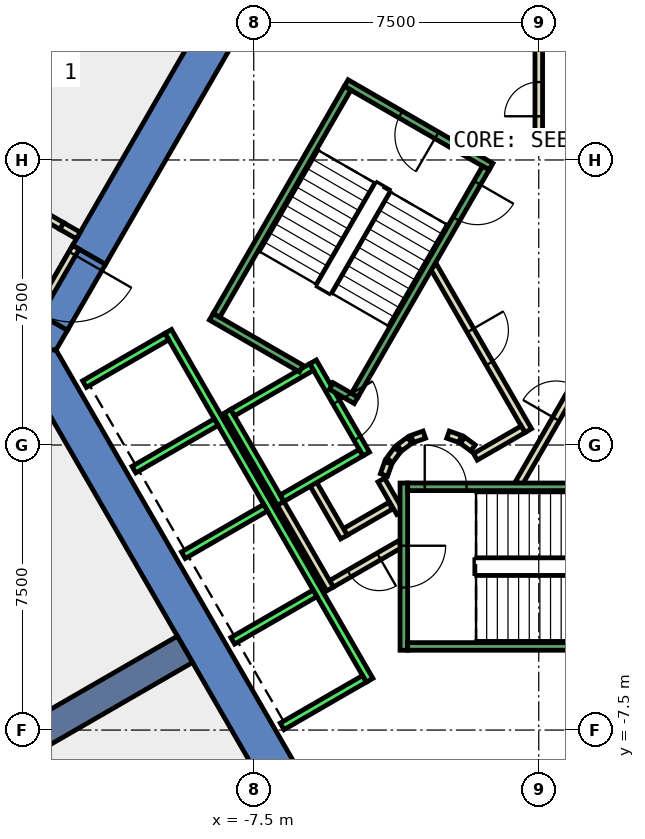
"""IFC4 building model, lengths in metres.
Left out: names, types, materials, properties, quantities, classifications, styles, units other than length and angle.
Written with IfcOpenShell. Run it as: python <this file> out.ifc"""

import sys

from ifc_helpers import new_model, si_unit, direction, frame, frame_2d, origin, place, context, subcontext, project, spatial, polyline, rectangle, outline, extrude, element, fill, save


model = new_model("IFC4")
c1 = context("Model", 3, precision=1e-05, world=origin(), true_north=direction((0.0, 1.0)))
c2 = subcontext(c1, "Body", "Model", "MODEL_VIEW")
j1 = project(units=[si_unit("LENGTHUNIT", "METRE"), si_unit("PLANEANGLEUNIT", "RADIAN")], contexts=[c1])
p1 = place(None, origin())
s1 = spatial("IfcSite", under=j1, at=p1, CompositionType="ELEMENT")
p2 = place(p1, origin())
s2 = spatial("IfcBuilding", under=s1, at=p2, CompositionType="ELEMENT")
p3 = place(p2, frame((0.0, 0.0, 68.6)))
s3 = spatial("IfcBuildingStorey", under=s2, at=p3, CompositionType="ELEMENT", Elevation=68.6)
p4 = place(p3, frame((0.0, 0.0, -0.4)))
e1 = element("IfcWall", 1, at=p4, inside=s3, PredefinedType="SHEAR", context=c2, shape_type="SweptSolid", body=[
    extrude(outline(polyline([(-12.267, 5.252), (-11.402, 4.752), (-6.351, 13.5), (-6.928, 14.5), (-12.267, 5.252)])), origin(), (0.0, 0.0, 1.0), 4.2),
])
p5 = place(p3, frame((0.0, 0.0, -0.4)))
e2 = element("IfcWall", 2, at=p5, inside=s3, PredefinedType="SHEAR", context=c2, shape_type="SweptSolid", body=[
    extrude(outline(polyline([(-12.402, 3.02), (-13.267, 3.52), (-13.856, 2.5), (-12.702, 2.5), (-12.402, 3.02)])), origin(), (0.0, 0.0, 1.0), 4.2),
])
p6 = place(p3, frame((0.0, 0.0, 3.6)))
e3 = element("IfcWall", 3, at=p6, inside=s3, PredefinedType="SHEAR", context=c2, shape_type="SweptSolid", body=[
    extrude(outline(polyline([(-13.267, 3.52), (-12.402, 3.02), (-11.402, 4.752), (-12.267, 5.252), (-13.267, 3.52)])), origin(), (0.0, 0.0, 1.0), 0.2),
])
p7 = place(p3, frame((0.0, 0.0, -0.4)))
e4 = element("IfcWall", 4, at=p7, inside=s3, PredefinedType="SHEAR", context=c2, shape_type="SweptSolid", body=[
    extrude(outline(polyline([(-13.856, 2.5), (-6.928, -9.5), (-6.351, -8.5), (-12.702, 2.5), (-13.856, 2.5)])), origin(), (0.0, 0.0, 1.0), 4.2),
])
p8 = place(p3, frame((-9.31, -5.375, -0.4), z_axis=(0.0, 0.0, 1.0), x_axis=(-0.866017533419, -0.500013631625, 0.0)))
e5 = element("IfcWall", 5, at=p8, inside=s3, PredefinedType="SHEAR", context=c2, shape_type="SweptSolid", body=[
    extrude(rectangle(XDim=9.0, YDim=0.8, at=frame_2d((4.5, 0.0))), origin(), (0.0, 0.0, 1.0), 4.2),
])
p9 = place(p3, frame((-17.783, 8.783, 0.0), z_axis=(0.0, 0.0, 1.0), x_axis=(0.866041598752, -0.499971948444, 0.0)))
e6 = element("IfcWall", 6, at=p9, inside=s3, PredefinedType="PARTITIONING", context=c2, shape_type="SweptSolid", body=[
    extrude(rectangle(XDim=6.042, YDim=0.2, at=frame_2d((3.021, 0.0))), origin(), (0.0, 0.0, 1.0), 3.8),
])
p10 = place(p9, frame((2.771, 0.0, 0.0)))
e7 = element("IfcOpeningElement", 7, at=p10, cuts=e6, PredefinedType="OPENING", context=c2, shape_type="SweptSolid", body=[
    extrude(rectangle(XDim=1.0, YDim=2.1, at=frame_2d((0.5, 1.05))), frame((0.0, 0.11, 0.0), z_axis=(0.0, -1.0, 0.0), x_axis=(1.0, 0.0, 0.0)), (0.0, 0.0, 1.0), 0.22),
])
p11 = place(p3, frame((1.88, 7.8, 0.0), z_axis=(0.0, 0.0, 1.0), x_axis=(-1.0, 0.0, 0.0)))
e8 = element("IfcWall", 8, at=p11, inside=s3, PredefinedType="PARTITIONING", context=c2, shape_type="SweptSolid", body=[
    extrude(rectangle(XDim=1.78, YDim=0.2, at=frame_2d((0.89, 0.0))), origin(), (0.0, 0.0, 1.0), 3.8),
])
p12 = place(p3, frame((0.0, 7.7, 0.0), z_axis=(0.0, 0.0, 1.0), x_axis=(0.000325520816, 0.999999947018, 0.0)))
e9 = element("IfcWall", 9, at=p12, inside=s3, PredefinedType="PARTITIONING", context=c2, shape_type="SweptSolid", body=[
    extrude(rectangle(XDim=3.0, YDim=0.2, at=frame_2d((1.5, 0.0))), origin(), (0.0, 0.0, 1.0), 3.8),
])
p13 = place(p12, frame((0.95, 0.0, 0.0)))
e10 = element("IfcOpeningElement", 10, at=p13, cuts=e9, PredefinedType="OPENING", context=c2, shape_type="SweptSolid", body=[
    extrude(rectangle(XDim=0.9, YDim=2.1, at=frame_2d((0.45, 1.05))), frame((0.0, 0.11, 0.0), z_axis=(0.0, -1.0, 0.0), x_axis=(1.0, 0.0, 0.0)), (0.0, 0.0, 1.0), 0.22),
])
p14 = place(p3, frame((-3.9, -1.599, 0.0), z_axis=(0.0, 0.0, 1.0), x_axis=(-0.865969445389, -0.500096910261, 0.0)))
e11 = element("IfcWall", 11, at=p14, inside=s3, PredefinedType="PARTITIONING", context=c2, shape_type="SweptSolid", body=[
    extrude(rectangle(XDim=1.373, YDim=0.2, at=frame_2d((0.687, 0.0))), origin(), (0.0, 0.0, 1.0), 3.8),
])
p15 = place(p3, frame((-5.126, -2.422, 0.0), z_axis=(0.0, 0.0, 1.0), x_axis=(-0.500062241894, 0.865989465428, 0.0)))
e12 = element("IfcWall", 12, at=p15, inside=s3, PredefinedType="PARTITIONING", context=c2, shape_type="SweptSolid", body=[
    extrude(rectangle(XDim=1.7, YDim=0.2, at=frame_2d((0.85, 0.0))), origin(), (0.0, 0.0, 1.0), 3.8),
])
p16 = place(p3, frame((-3.65, -2.61, 0.0), z_axis=(0.0, 0.0, 1.0), x_axis=(-0.866072462134, -0.499918483688, 0.0)))
e13 = element("IfcWall", 13, at=p16, inside=s3, PredefinedType="PARTITIONING", context=c2, shape_type="SweptSolid", body=[
    extrude(rectangle(XDim=2.084, YDim=0.2, at=frame_2d((1.042, 0.0))), origin(), (0.0, 0.0, 1.0), 3.8),
])
p17 = place(p16, frame((0.642, 0.0, 0.0)))
e14 = element("IfcOpeningElement", 14, at=p17, cuts=e13, PredefinedType="OPENING", context=c2, shape_type="SweptSolid", body=[
    extrude(rectangle(XDim=0.9, YDim=2.1, at=frame_2d((0.45, 1.05))), frame((0.0, 0.11, 0.0), z_axis=(0.0, -1.0, 0.0), x_axis=(1.0, 0.0, 0.0)), (0.0, 0.0, 1.0), 0.22),
])
p18 = place(p3, frame((-5.492, -3.788, 0.0), z_axis=(0.0, 0.0, 1.0), x_axis=(-0.500008949224, 0.866020236886, 0.0)))
e15 = element("IfcWall", 15, at=p18, inside=s3, PredefinedType="PARTITIONING", context=c2, shape_type="SweptSolid", body=[
    extrude(rectangle(XDim=2.68, YDim=0.2, at=frame_2d((1.34, 0.0))), origin(), (0.0, 0.0, 1.0), 3.8),
])
p19 = place(p3, frame((-4.145, -0.92, 0.0), z_axis=(0.0, 0.0, 1.0), x_axis=(0.499743786207, -0.866173278362, 0.0)))
e16 = element("IfcWall", 16, at=p19, inside=s3, PredefinedType="PARTITIONING", context=c2, shape_type="SweptSolid", body=[
    extrude(rectangle(XDim=0.991, YDim=0.2, at=frame_2d((0.495, 0.0))), origin(), (0.0, 0.0, 1.0), 3.8),
])
p20 = place(p3, frame((-0.52, -1.0, 0.0), z_axis=(0.0, 0.0, 1.0), x_axis=(0.50011622646, 0.865958290007, 0.0)))
e17 = element("IfcWall", 17, at=p20, inside=s3, PredefinedType="PARTITIONING", context=c2, shape_type="SweptSolid", body=[
    extrude(rectangle(XDim=4.991, YDim=0.2, at=frame_2d((2.496, 0.0))), origin(), (0.0, 0.0, 1.0), 3.8),
])
p21 = place(p20, frame((1.945, 0.0, 0.0)))
e18 = element("IfcOpeningElement", 18, at=p21, cuts=e17, PredefinedType="OPENING", context=c2, shape_type="SweptSolid", body=[
    extrude(rectangle(XDim=1.0, YDim=2.1, at=frame_2d((0.5, 1.05))), frame((0.0, 0.11, 0.0), z_axis=(0.0, -1.0, 0.0), x_axis=(1.0, 0.0, 0.0)), (0.0, 0.0, 1.0), 0.22),
])
p22 = place(p3, frame((-2.771, 4.7, 0.0), z_axis=(0.0, 0.0, 1.0), x_axis=(0.499969479948, -0.866043023828, 0.0)))
e19 = element("IfcWall", 19, at=p22, inside=s3, PredefinedType="PARTITIONING", context=c2, shape_type="SweptSolid", body=[
    extrude(rectangle(XDim=4.99, YDim=0.2, at=frame_2d((2.495, 0.0))), origin(), (0.0, 0.0, 1.0), 3.8),
])
p23 = place(p22, frame((1.945, 0.0, 0.0)))
e20 = element("IfcOpeningElement", 20, at=p23, cuts=e19, PredefinedType="OPENING", context=c2, shape_type="SweptSolid", body=[
    extrude(rectangle(XDim=1.0, YDim=2.1, at=frame_2d((0.5, 1.05))), frame((0.0, 0.11, 0.0), z_axis=(0.0, -1.0, 0.0), x_axis=(1.0, 0.0, 0.0)), (0.0, 0.0, 1.0), 0.22),
])
p24 = place(p3, frame((-0.412, 0.414, 0.0), z_axis=(0.0, 0.0, 1.0), x_axis=(-0.866017369001, -0.500013916395, 0.0)))
e21 = element("IfcWall", 21, at=p24, inside=s3, PredefinedType="PARTITIONING", context=c2, shape_type="SweptSolid", body=[
    extrude(rectangle(XDim=1.45, YDim=0.2, at=frame_2d((0.725, 0.0))), origin(), (0.0, 0.0, 1.0), 3.8),
])
p25 = place(p3, frame((-1.731, -0.077, 0.0), z_axis=(0.0, 0.0, 1.0), x_axis=(-0.804311165252, 0.594208338422, 0.0)))
e22 = element("IfcWall", 22, at=p25, inside=s3, PredefinedType="PARTITIONING", context=c2, shape_type="SweptSolid", body=[
    extrude(rectangle(XDim=0.338, YDim=0.2, at=frame_2d((0.169, 0.0))), origin(), (0.0, 0.0, 1.0), 3.8),
])
p26 = place(p3, frame((-2.07, 0.16, 0.0), z_axis=(0.0, 0.0, 1.0), x_axis=(-0.942199461132, 0.335052496547, 0.0)))
e23 = element("IfcWall", 23, at=p26, inside=s3, PredefinedType="PARTITIONING", context=c2, shape_type="SweptSolid", body=[
    extrude(rectangle(XDim=0.337, YDim=0.2, at=frame_2d((0.169, 0.0))), origin(), (0.0, 0.0, 1.0), 3.8),
])
p27 = place(p3, frame((-3.012, 0.273, 0.0), z_axis=(0.0, 0.0, 1.0), x_axis=(-0.942280615813, -0.334824194261, 0.0)))
e24 = element("IfcWall", 24, at=p27, inside=s3, PredefinedType="PARTITIONING", context=c2, shape_type="SweptSolid", body=[
    extrude(rectangle(XDim=0.338, YDim=0.2, at=frame_2d((0.169, 0.0))), origin(), (0.0, 0.0, 1.0), 3.8),
])
p28 = place(p3, frame((-3.397, 0.124, 0.0), z_axis=(0.0, 0.0, 1.0), x_axis=(-0.804311165252, -0.594208338422, 0.0)))
e25 = element("IfcWall", 25, at=p28, inside=s3, PredefinedType="PARTITIONING", context=c2, shape_type="SweptSolid", body=[
    extrude(rectangle(XDim=0.338, YDim=0.2, at=frame_2d((0.169, 0.0))), origin(), (0.0, 0.0, 1.0), 3.8),
])
p29 = place(p3, frame((-3.723, -0.131, 0.0), z_axis=(0.0, 0.0, 1.0), x_axis=(-0.594675113454, -0.803966112121, 0.0)))
e26 = element("IfcWall", 26, at=p29, inside=s3, PredefinedType="PARTITIONING", context=c2, shape_type="SweptSolid", body=[
    extrude(rectangle(XDim=0.338, YDim=0.2, at=frame_2d((0.169, 0.0))), origin(), (0.0, 0.0, 1.0), 3.8),
])
p30 = place(p3, frame((-3.96, -0.47, 0.0), z_axis=(0.0, 0.0, 1.0), x_axis=(-0.334824194261, -0.942280615813, 0.0)))
e27 = element("IfcWall", 27, at=p30, inside=s3, PredefinedType="PARTITIONING", context=c2, shape_type="SweptSolid", body=[
    extrude(rectangle(XDim=0.338, YDim=0.2, at=frame_2d((0.169, 0.0))), origin(), (0.0, 0.0, 1.0), 3.8),
])
p31 = place(p3, frame((-12.18, 5.202, 0.0), z_axis=(0.0, 0.0, 1.0), x_axis=(-0.50002537861, -0.866010750942, 0.0)))
e28 = element("IfcWall", 28, at=p31, inside=s3, PredefinedType="PARTITIONING", context=c2, shape_type="SweptSolid", body=[
    extrude(rectangle(XDim=2.0, YDim=0.2, at=frame_2d((1.0, 0.0))), origin(), (0.0, 0.0, 1.0), 2.4),
])
p32 = place(p31, frame((0.19, 0.0, 0.0)))
e29 = element("IfcOpeningElement", 29, at=p32, cuts=e28, PredefinedType="OPENING", context=c2, shape_type="SweptSolid", body=[
    extrude(rectangle(XDim=1.8, YDim=2.1, at=frame_2d((0.9, 1.05))), frame((0.0, 0.11, 0.0), z_axis=(0.0, -1.0, 0.0), x_axis=(1.0, 0.0, 0.0)), (0.0, 0.0, 1.0), 0.22),
])
p33 = place(p3, frame((-12.55, 5.762, 0.0), z_axis=(0.0, 0.0, 1.0), x_axis=(0.866071776036, -0.499919672301, 0.0)))
e30 = element("IfcWall", 30, at=p33, inside=s3, PredefinedType="PARTITIONING", context=c2, shape_type="SweptSolid", body=[
    extrude(rectangle(XDim=0.5, YDim=0.2, at=frame_2d((0.25, 0.0))), origin(), (0.0, 0.0, 1.0), 2.4),
])
p34 = place(p3, frame((-5.94, 2.188, 0.0), z_axis=(0.0, 0.0, 1.0), x_axis=(0.49994636267, -0.866056369097, 0.0)))
e31 = element("IfcWall", 31, at=p34, inside=s3, PredefinedType="STANDARD", context=c2, shape_type="SweptSolid", body=[
    extrude(rectangle(XDim=2.8, YDim=0.2, at=frame_2d((1.4, 0.0))), origin(), (0.0, 0.0, 1.0), 3.8),
])
p35 = place(p34, frame((1.225, 0.0, 0.0)))
e32 = element("IfcOpeningElement", 32, at=p35, cuts=e31, PredefinedType="OPENING", context=c2, shape_type="SweptSolid", body=[
    extrude(rectangle(XDim=1.1, YDim=2.1, at=frame_2d((0.55, 1.05))), frame((0.0, 0.11, 0.0), z_axis=(0.0, -1.0, 0.0), x_axis=(1.0, 0.0, 0.0)), (0.0, 0.0, 1.0), 0.22),
])
p36 = place(p3, frame((-8.192, 0.888, 0.0), z_axis=(0.0, 0.0, 1.0), x_axis=(0.49994636267, -0.866056369097, 0.0)))
e33 = element("IfcWall", 33, at=p36, inside=s3, PredefinedType="STANDARD", context=c2, shape_type="SweptSolid", body=[
    extrude(rectangle(XDim=2.8, YDim=0.2, at=frame_2d((1.4, 0.0))), origin(), (0.0, 0.0, 1.0), 3.8),
])
for number, where, z_axis, x_axis in (
    (34, (-5.977, 2.052, 0.0), (0.0, 0.0, 1.0), (-0.866, -0.5, 0.0)),
    (35, (-4.677, -0.2, 0.0), (0.0, 0.0, 1.0), (-0.866, -0.5, 0.0)),
):
    element("IfcWall", number, at=place(p3, frame(where, z_axis=z_axis, x_axis=x_axis)), inside=s3, PredefinedType="STANDARD", context=c2, shape_type="SweptSolid", body=[
        extrude(rectangle(XDim=2.399, YDim=0.2, at=frame_2d((1.2, 0.0))), origin(), (0.0, 0.0, 1.0), 3.8),
    ])
p37 = place(p3, frame((-9.751, 2.99, 0.0), z_axis=(0.0, 0.0, 1.0), x_axis=(0.50000090737, -0.866024879913, 0.0)))
e36 = element("IfcWall", 36, at=p37, inside=s3, PredefinedType="STANDARD", context=c2, shape_type="SweptSolid", body=[
    extrude(rectangle(XDim=10.6, YDim=0.2, at=frame_2d((5.3, 0.0))), origin(), (0.0, 0.0, 1.0), 3.8),
])
p38 = place(p3, frame((-9.788, 2.853, 0.0), z_axis=(0.0, 0.0, 1.0), x_axis=(-0.865998541277, -0.500046524342, 0.0)))
e37 = element("IfcWall", 37, at=p38, inside=s3, PredefinedType="STANDARD", context=c2, shape_type="SweptSolid", body=[
    extrude(rectangle(XDim=2.5, YDim=0.2, at=frame_2d((1.25, 0.0))), origin(), (0.0, 0.0, 1.0), 3.8),
])
for number, where, z_axis, x_axis in (
    (38, (-8.488, 0.602, 0.0), (0.0, 0.0, 1.0), (-0.866, -0.5, 0.0)),
    (39, (-7.188, -1.65, 0.0), (0.0, 0.0, 1.0), (-0.866, -0.5, 0.0)),
    (40, (-5.888, -3.902, 0.0), (0.0, 0.0, 1.0), (-0.866, -0.5, 0.0)),
    (41, (-4.588, -6.153, 0.0), (0.0, 0.0, 1.0), (-0.866, -0.5, 0.0)),
):
    element("IfcWall", number, at=place(p3, frame(where, z_axis=z_axis, x_axis=x_axis)), inside=s3, PredefinedType="STANDARD", context=c2, shape_type="SweptSolid", body=[
        extrude(rectangle(XDim=2.5, YDim=0.2, at=frame_2d((1.25, 0.0))), origin(), (0.0, 0.0, 1.0), 3.8),
    ])
p39 = place(p3, frame((-3.55, -1.0, 0.0), z_axis=(0.0, 0.0, 1.0), x_axis=(0.0, -1.0, 0.0)))
e42 = element("IfcWall", 42, at=p39, inside=s3, PredefinedType="STANDARD", context=c2, shape_type="SweptSolid", body=[
    extrude(rectangle(XDim=4.4, YDim=0.2, at=frame_2d((2.2, 0.0))), origin(), (0.0, 0.0, 1.0), 3.8),
])
p40 = place(p39, frame((1.65, 0.0, 0.0)))
e43 = element("IfcOpeningElement", 43, at=p40, cuts=e42, PredefinedType="OPENING", context=c2, shape_type="SweptSolid", body=[
    extrude(rectangle(XDim=1.1, YDim=2.2, at=frame_2d((0.55, 1.1))), frame((0.0, 0.11, 0.0), z_axis=(0.0, -1.0, 0.0), x_axis=(1.0, 0.0, 0.0)), (0.0, 0.0, 1.0), 0.22),
])
p41 = place(p3, frame((-3.45, -1.1, 0.0), z_axis=(0.0, 0.0, 1.0), x_axis=(1.0, 0.0, 0.0)))
e44 = element("IfcWall", 44, at=p41, inside=s3, PredefinedType="STANDARD", context=c2, shape_type="SweptSolid", body=[
    extrude(rectangle(XDim=6.9, YDim=0.2, at=frame_2d((3.45, 0.0))), origin(), (0.0, 0.0, 1.0), 3.8),
])
p42 = place(p41, frame((0.45, 0.0, 0.0)))
e45 = element("IfcOpeningElement", 45, at=p42, cuts=e44, PredefinedType="OPENING", context=c2, shape_type="SweptSolid", body=[
    extrude(rectangle(XDim=1.1, YDim=2.2, at=frame_2d((0.55, 1.1))), frame((0.0, 0.11, 0.0), z_axis=(0.0, -1.0, 0.0), x_axis=(1.0, 0.0, 0.0)), (0.0, 0.0, 1.0), 0.22),
])
p43 = place(p3, frame((-3.45, -5.3, 0.0), z_axis=(0.0, 0.0, 1.0), x_axis=(1.0, 0.0, 0.0)))
e46 = element("IfcWall", 46, at=p43, inside=s3, PredefinedType="STANDARD", context=c2, shape_type="SweptSolid", body=[
    extrude(rectangle(XDim=6.9, YDim=0.2, at=frame_2d((3.45, 0.0))), origin(), (0.0, 0.0, 1.0), 3.8),
])
p44 = place(p3, frame((-1.256, 7.324, 0.0), z_axis=(0.0, 0.0, 1.0), x_axis=(-0.866046073146, 0.499964197906, 0.0)))
e47 = element("IfcWall", 47, at=p44, inside=s3, PredefinedType="STANDARD", context=c2, shape_type="SweptSolid", body=[
    extrude(rectangle(XDim=4.4, YDim=0.2, at=frame_2d((2.2, 0.0))), origin(), (0.0, 0.0, 1.0), 3.8),
])
p45 = place(p44, frame((1.65, 0.0, 0.0)))
e48 = element("IfcOpeningElement", 48, at=p45, cuts=e47, PredefinedType="OPENING", context=c2, shape_type="SweptSolid", body=[
    extrude(rectangle(XDim=1.1, YDim=2.2, at=frame_2d((0.55, 1.1))), frame((0.0, 0.11, 0.0), z_axis=(0.0, -1.0, 0.0), x_axis=(1.0, 0.0, 0.0)), (0.0, 0.0, 1.0), 0.22),
])
p46 = place(p3, frame((-6.25, 2.01, 0.0), z_axis=(0.0, 0.0, 1.0), x_axis=(-0.86611865017, 0.499838457731, 0.0)))
e49 = element("IfcWall", 49, at=p46, inside=s3, PredefinedType="STANDARD", context=c2, shape_type="SweptSolid", body=[
    extrude(rectangle(XDim=2.733, YDim=0.2, at=frame_2d((1.366, 0.0))), origin(), (0.0, 0.0, 1.0), 3.8),
])
p47 = place(p3, frame((-4.806, 1.176, 0.0), z_axis=(0.0, 0.0, 1.0), x_axis=(-0.866558586415, 0.499075361355, 0.0)))
e50 = element("IfcWall", 50, at=p47, inside=s3, PredefinedType="STANDARD", context=c2, shape_type="SweptSolid", body=[
    extrude(rectangle(XDim=0.751, YDim=0.2, at=frame_2d((0.376, 0.0))), origin(), (0.0, 0.0, 1.0), 3.8),
])
p48 = place(p3, frame((-1.393, 7.288, 0.0), z_axis=(0.0, 0.0, 1.0), x_axis=(-0.499963383562, -0.866046543262, 0.0)))
e51 = element("IfcWall", 51, at=p48, inside=s3, PredefinedType="STANDARD", context=c2, shape_type="SweptSolid", body=[
    extrude(rectangle(XDim=6.9, YDim=0.2, at=frame_2d((3.45, 0.0))), origin(), (0.0, 0.0, 1.0), 3.8),
])
p49 = place(p48, frame((0.45, 0.0, 0.0)))
e52 = element("IfcOpeningElement", 52, at=p49, cuts=e51, PredefinedType="OPENING", context=c2, shape_type="SweptSolid", body=[
    extrude(rectangle(XDim=1.1, YDim=2.2, at=frame_2d((0.55, 1.1))), frame((0.0, 0.11, 0.0), z_axis=(0.0, -1.0, 0.0), x_axis=(1.0, 0.0, 0.0)), (0.0, 0.0, 1.0), 0.22),
])
p50 = place(p3, frame((-5.03, 9.388, 0.0), z_axis=(0.0, 0.0, 1.0), x_axis=(-0.499978703459, -0.866037698999, 0.0)))
e53 = element("IfcWall", 53, at=p50, inside=s3, PredefinedType="STANDARD", context=c2, shape_type="SweptSolid", body=[
    extrude(rectangle(XDim=6.9, YDim=0.2, at=frame_2d((3.45, 0.0))), origin(), (0.0, 0.0, 1.0), 3.8),
])
p51 = place(p21, origin())
e54 = element("IfcDoor", 54, at=p51, inside=s3, OperationType="SINGLE_SWING_LEFT", PredefinedType="DOOR", context=c2, shape_type="SweptSolid", body=[
    extrude(rectangle(XDim=1.0, YDim=2.1, at=frame_2d((0.5, 1.05))), frame((0.0, 0.025, 0.0), z_axis=(0.0, -1.0, 0.0), x_axis=(1.0, 0.0, 0.0)), (0.0, 0.0, 1.0), 0.05),
])
fill(e18, e54)
p52 = place(p23, origin())
e55 = element("IfcDoor", 55, at=p52, inside=s3, OperationType="SINGLE_SWING_RIGHT", PredefinedType="DOOR", context=c2, shape_type="SweptSolid", body=[
    extrude(rectangle(XDim=1.0, YDim=2.1, at=frame_2d((0.5, 1.05))), frame((0.0, 0.025, 0.0), z_axis=(0.0, -1.0, 0.0), x_axis=(1.0, 0.0, 0.0)), (0.0, 0.0, 1.0), 0.05),
])
fill(e20, e55)
p53 = place(p13, origin())
e56 = element("IfcDoor", 56, at=p53, inside=s3, OperationType="SINGLE_SWING_RIGHT", PredefinedType="DOOR", context=c2, shape_type="SweptSolid", body=[
    extrude(rectangle(XDim=0.9, YDim=2.1, at=frame_2d((0.45, 1.05))), frame((0.0, 0.025, 0.0), z_axis=(0.0, -1.0, 0.0), x_axis=(1.0, 0.0, 0.0)), (0.0, 0.0, 1.0), 0.05),
])
fill(e10, e56)
p54 = place(p17, origin())
e57 = element("IfcDoor", 57, at=p54, inside=s3, OperationType="SINGLE_SWING_LEFT", PredefinedType="DOOR", context=c2, shape_type="SweptSolid", body=[
    extrude(rectangle(XDim=0.9, YDim=2.1, at=frame_2d((0.45, 1.05))), frame((0.0, 0.025, 0.0), z_axis=(0.0, -1.0, 0.0), x_axis=(1.0, 0.0, 0.0)), (0.0, 0.0, 1.0), 0.05),
])
fill(e14, e57)
p55 = place(p32, origin())
e58 = element("IfcDoor", 58, at=p55, inside=s3, OperationType="DOUBLE_DOOR_SINGLE_SWING", PredefinedType="DOOR", context=c2, shape_type="SweptSolid", body=[
    extrude(rectangle(XDim=1.8, YDim=2.1, at=frame_2d((0.9, 1.05))), frame((0.0, 0.025, 0.0), z_axis=(0.0, -1.0, 0.0), x_axis=(1.0, 0.0, 0.0)), (0.0, 0.0, 1.0), 0.05),
])
fill(e29, e58)
p56 = place(p35, origin())
e59 = element("IfcDoor", 59, at=p56, inside=s3, OperationType="SLIDING_TO_LEFT", PredefinedType="DOOR", context=c2, shape_type="SweptSolid", body=[
    extrude(rectangle(XDim=1.1, YDim=2.1, at=frame_2d((0.55, 1.05))), frame((0.0, 0.025, 0.0), z_axis=(0.0, -1.0, 0.0), x_axis=(1.0, 0.0, 0.0)), (0.0, 0.0, 1.0), 0.05),
])
fill(e32, e59)
p57 = place(p42, origin())
e60 = element("IfcDoor", 60, at=p57, inside=s3, OperationType="SINGLE_SWING_LEFT", PredefinedType="DOOR", context=c2, shape_type="SweptSolid", body=[
    extrude(rectangle(XDim=1.1, YDim=2.2, at=frame_2d((0.55, 1.1))), frame((0.0, 0.025, 0.0), z_axis=(0.0, -1.0, 0.0), x_axis=(1.0, 0.0, 0.0)), (0.0, 0.0, 1.0), 0.05),
])
fill(e45, e60)
p58 = place(p40, origin())
e61 = element("IfcDoor", 61, at=p58, inside=s3, OperationType="SINGLE_SWING_LEFT", PredefinedType="DOOR", context=c2, shape_type="SweptSolid", body=[
    extrude(rectangle(XDim=1.1, YDim=2.2, at=frame_2d((0.55, 1.1))), frame((0.0, 0.025, 0.0), z_axis=(0.0, -1.0, 0.0), x_axis=(1.0, 0.0, 0.0)), (0.0, 0.0, 1.0), 0.05),
])
fill(e43, e61)
p59 = place(p49, origin())
e62 = element("IfcDoor", 62, at=p59, inside=s3, OperationType="SINGLE_SWING_LEFT", PredefinedType="DOOR", context=c2, shape_type="SweptSolid", body=[
    extrude(rectangle(XDim=1.1, YDim=2.2, at=frame_2d((0.55, 1.1))), frame((0.0, 0.025, 0.0), z_axis=(0.0, -1.0, 0.0), x_axis=(1.0, 0.0, 0.0)), (0.0, 0.0, 1.0), 0.05),
])
fill(e52, e62)
p60 = place(p45, origin())
e63 = element("IfcDoor", 63, at=p60, inside=s3, OperationType="SINGLE_SWING_LEFT", PredefinedType="DOOR", context=c2, shape_type="SweptSolid", body=[
    extrude(rectangle(XDim=1.1, YDim=2.2, at=frame_2d((0.55, 1.1))), frame((0.0, 0.025, 0.0), z_axis=(0.0, -1.0, 0.0), x_axis=(1.0, 0.0, 0.0)), (0.0, 0.0, 1.0), 0.05),
])
fill(e48, e63)
save(model, sys.argv[1])
